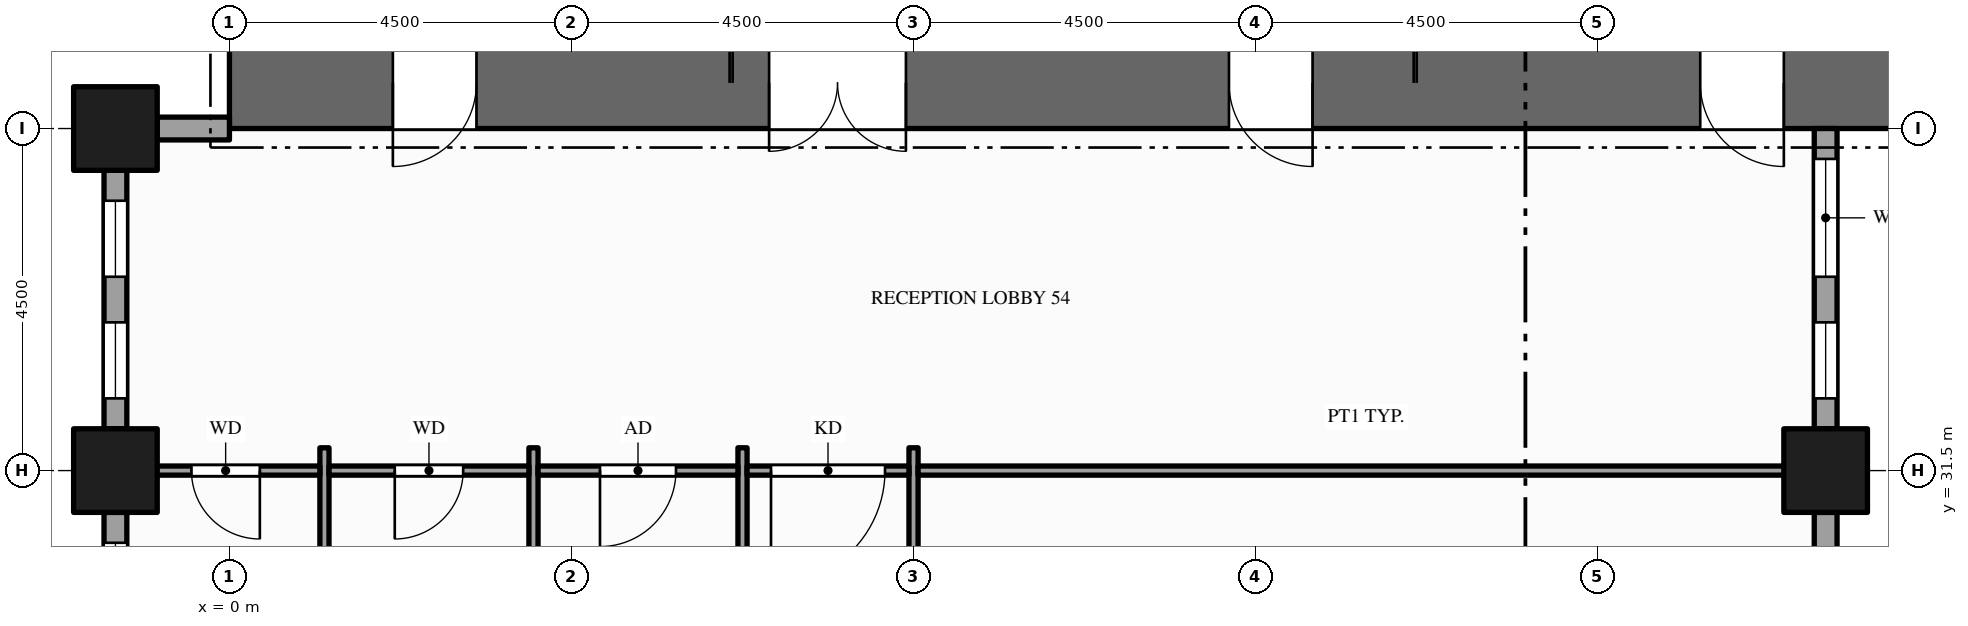
"""IFC4 building model, lengths in metres.
Left out: names, types, materials, properties, quantities, classifications, styles, units other than length and angle.
Written with IfcOpenShell. Run it as: python <this file> out.ifc"""

import sys

from ifc_helpers import new_model, si_unit, direction, frame, frame_2d, origin, origin_2d, place, context, subcontext, project, spatial, rectangle, hollow_rectangle, extrude, element, fill, save


model = new_model("IFC4")
c1 = context("Model", 3, precision=1e-05, world=origin(), true_north=direction((0.0, 1.0)))
c2 = subcontext(c1, "Body", "Model", "MODEL_VIEW")
j1 = project(units=[si_unit("LENGTHUNIT", "METRE"), si_unit("PLANEANGLEUNIT", "RADIAN")], contexts=[c1])
p1 = place(None, origin())
s1 = spatial("IfcSite", under=j1, at=p1, CompositionType="ELEMENT")
p2 = place(p1, origin())
s2 = spatial("IfcBuilding", under=s1, at=p2, CompositionType="ELEMENT")
p3 = place(p2, frame((0.0, 0.0, 45.0)))
s3 = spatial("IfcBuildingStorey", under=s2, at=p3, CompositionType="ELEMENT", Elevation=45.0)
p4 = place(p3, frame((0.0, 36.6, -0.15), z_axis=(0.0, 0.0, 1.0), x_axis=(1.0, 0.0, 0.0)))
e1 = element("IfcWall", 1, at=p4, inside=s3, PredefinedType="SHEAR", context=c2, shape_type="SweptSolid", body=[
    extrude(rectangle(XDim=22.5, YDim=1.2, at=frame_2d((11.25, 0.0))), origin(), (0.0, 0.0, 1.0), 4.0),
])
p5 = place(p4, frame((7.1, 0.0, 0.15)))
e2 = element("IfcOpeningElement", 2, at=p5, cuts=e1, PredefinedType="OPENING", context=c2, shape_type="SweptSolid", body=[
    extrude(rectangle(XDim=1.8, YDim=2.1, at=frame_2d((0.9, 1.05))), frame((0.0, 0.61, 0.0), z_axis=(0.0, -1.0, 0.0), x_axis=(1.0, 0.0, 0.0)), (0.0, 0.0, 1.0), 1.22),
])
p6 = place(p4, frame((13.15, 0.0, 0.15)))
e3 = element("IfcOpeningElement", 3, at=p6, cuts=e1, PredefinedType="OPENING", context=c2, shape_type="SweptSolid", body=[
    extrude(rectangle(XDim=1.1, YDim=2.1, at=frame_2d((0.55, 1.05))), frame((0.0, 0.61, 0.0), z_axis=(0.0, -1.0, 0.0), x_axis=(1.0, 0.0, 0.0)), (0.0, 0.0, 1.0), 1.22),
])
p7 = place(p4, frame((2.15, 0.0, 0.15)))
e4 = element("IfcOpeningElement", 4, at=p7, cuts=e1, PredefinedType="OPENING", context=c2, shape_type="SweptSolid", body=[
    extrude(rectangle(XDim=1.1, YDim=2.1, at=frame_2d((0.55, 1.05))), frame((0.0, 0.61, 0.0), z_axis=(0.0, -1.0, 0.0), x_axis=(1.0, 0.0, 0.0)), (0.0, 0.0, 1.0), 1.22),
])
p8 = place(p4, frame((19.35, 0.0, 0.15)))
e5 = element("IfcOpeningElement", 5, at=p8, cuts=e1, PredefinedType="OPENING", context=c2, shape_type="SweptSolid", body=[
    extrude(rectangle(XDim=1.1, YDim=2.1, at=frame_2d((0.55, 1.05))), frame((0.0, 0.61, 0.0), z_axis=(0.0, -1.0, 0.0), x_axis=(1.0, 0.0, 0.0)), (0.0, 0.0, 1.0), 1.22),
])
for number, where, z_axis, x_axis in (
    (6, (-1.5, 31.5, -0.15), (0.0, 0.0, 1.0), (1.0, 0.0, 0.0)),
    (7, (-1.5, 36.0, -0.15), (0.0, 0.0, 1.0), (1.0, 0.0, 0.0)),
    (8, (21.0, 31.5, -0.15), (0.0, 0.0, 1.0), (1.0, 0.0, 0.0)),
):
    element("IfcColumn", number, at=place(p3, frame(where, z_axis=z_axis, x_axis=x_axis)), inside=s3, PredefinedType="COLUMN", context=c2, shape_type="SweptSolid", body=[
        extrude(hollow_rectangle(XDim=1.1, YDim=1.1, WallThickness=0.06, at=origin_2d()), origin(), (0.0, 0.0, 1.0), 4.0),
    ])
p9 = place(p3, frame((21.0, 29.05, 0.0), z_axis=(0.0, 0.0, 1.0), x_axis=(0.0, 1.0, 0.0)))
e9 = element("IfcWall", 9, at=p9, inside=s3, PredefinedType="STANDARD", context=c2, shape_type="SweptSolid", body=[
    extrude(rectangle(XDim=1.9, YDim=0.3, at=frame_2d((0.95, 0.0))), origin(), (0.0, 0.0, 1.0), 3.144),
])
p10 = place(p3, frame((21.0, 32.05, 0.0), z_axis=(0.0, 0.0, 1.0), x_axis=(0.0, 1.0, 0.0)))
e10 = element("IfcWall", 10, at=p10, inside=s3, PredefinedType="STANDARD", context=c2, shape_type="SweptSolid", body=[
    extrude(rectangle(XDim=3.95, YDim=0.3, at=frame_2d((1.975, 0.0))), origin(), (0.0, 0.0, 1.0), 3.144),
])
p11 = place(p10, frame((0.4, 0.0, 0.9)))
e11 = element("IfcOpeningElement", 11, at=p11, cuts=e10, PredefinedType="OPENING", context=c2, shape_type="SweptSolid", body=[
    extrude(rectangle(XDim=1.0, YDim=2.0, at=frame_2d((0.5, 1.0))), frame((0.0, 0.16, 0.0), z_axis=(0.0, -1.0, 0.0), x_axis=(1.0, 0.0, 0.0)), (0.0, 0.0, 1.0), 0.32),
])
p12 = place(p10, frame((2.0, 0.0, 0.9)))
e12 = element("IfcOpeningElement", 12, at=p12, cuts=e10, PredefinedType="OPENING", context=c2, shape_type="SweptSolid", body=[
    extrude(rectangle(XDim=1.55, YDim=2.0, at=frame_2d((0.775, 1.0))), frame((0.0, 0.16, 0.0), z_axis=(0.0, -1.0, 0.0), x_axis=(1.0, 0.0, 0.0)), (0.0, 0.0, 1.0), 0.32),
])
p13 = place(p3, frame((0.0, 36.0, 0.0), z_axis=(0.0, 0.0, 1.0), x_axis=(-1.0, 0.0, 0.0)))
e13 = element("IfcWall", 13, at=p13, inside=s3, PredefinedType="STANDARD", context=c2, shape_type="SweptSolid", body=[
    extrude(rectangle(XDim=0.95, YDim=0.3, at=frame_2d((0.475, 0.0))), origin(), (0.0, 0.0, 1.0), 2.938),
])
p14 = place(p3, frame((-1.5, 35.45, 0.0), z_axis=(0.0, 0.0, 1.0), x_axis=(0.0, -1.0, 0.0)))
e14 = element("IfcWall", 14, at=p14, inside=s3, PredefinedType="STANDARD", context=c2, shape_type="SweptSolid", body=[
    extrude(rectangle(XDim=3.4, YDim=0.3, at=frame_2d((1.7, 0.0))), origin(), (0.0, 0.0, 1.0), 3.144),
])
p15 = place(p14, frame((0.4, 0.0, 0.9)))
e15 = element("IfcOpeningElement", 15, at=p15, cuts=e14, PredefinedType="OPENING", context=c2, shape_type="SweptSolid", body=[
    extrude(rectangle(XDim=1.0, YDim=2.0, at=frame_2d((0.5, 1.0))), frame((0.0, 0.16, 0.0), z_axis=(0.0, -1.0, 0.0), x_axis=(1.0, 0.0, 0.0)), (0.0, 0.0, 1.0), 0.32),
])
p16 = place(p14, frame((2.0, 0.0, 0.9)))
e16 = element("IfcOpeningElement", 16, at=p16, cuts=e14, PredefinedType="OPENING", context=c2, shape_type="SweptSolid", body=[
    extrude(rectangle(XDim=1.0, YDim=2.0, at=frame_2d((0.5, 1.0))), frame((0.0, 0.16, 0.0), z_axis=(0.0, -1.0, 0.0), x_axis=(1.0, 0.0, 0.0)), (0.0, 0.0, 1.0), 0.32),
])
p17 = place(p3, frame((-1.5, 30.95, 0.0), z_axis=(0.0, 0.0, 1.0), x_axis=(0.0, -1.0, 0.0)))
e17 = element("IfcWall", 17, at=p17, inside=s3, PredefinedType="STANDARD", context=c2, shape_type="SweptSolid", body=[
    extrude(rectangle(XDim=3.4, YDim=0.3, at=frame_2d((1.7, 0.0))), origin(), (0.0, 0.0, 1.0), 3.144),
])
p18 = place(p17, frame((0.4, 0.0, 0.9)))
e18 = element("IfcOpeningElement", 18, at=p18, cuts=e17, PredefinedType="OPENING", context=c2, shape_type="SweptSolid", body=[
    extrude(rectangle(XDim=1.0, YDim=2.0, at=frame_2d((0.5, 1.0))), frame((0.0, 0.16, 0.0), z_axis=(0.0, -1.0, 0.0), x_axis=(1.0, 0.0, 0.0)), (0.0, 0.0, 1.0), 0.32),
])
p19 = place(p17, frame((2.0, 0.0, 0.9)))
e19 = element("IfcOpeningElement", 19, at=p19, cuts=e17, PredefinedType="OPENING", context=c2, shape_type="SweptSolid", body=[
    extrude(rectangle(XDim=1.0, YDim=2.0, at=frame_2d((0.5, 1.0))), frame((0.0, 0.16, 0.0), z_axis=(0.0, -1.0, 0.0), x_axis=(1.0, 0.0, 0.0)), (0.0, 0.0, 1.0), 0.32),
])
for number, where, z_axis, x_axis in (
    (20, (1.25, 26.7, 0.0), (0.0, 0.0, 1.0), (0.0, 1.0, 0.0)),
    (21, (4.0, 26.7, 0.0), (0.0, 0.0, 1.0), (0.0, 1.0, 0.0)),
):
    element("IfcWall", number, at=place(p3, frame(where, z_axis=z_axis, x_axis=x_axis)), inside=s3, PredefinedType="PARTITIONING", context=c2, shape_type="SweptSolid", body=[
        extrude(rectangle(XDim=5.1, YDim=0.12, at=frame_2d((2.55, 0.0))), origin(), (0.0, 0.0, 1.0), 3.85),
    ])
p20 = place(p3, frame((6.75, 13.2, 0.0), z_axis=(0.0, 0.0, 1.0), x_axis=(0.0, 1.0, 0.0)))
e22 = element("IfcWall", 22, at=p20, inside=s3, PredefinedType="PARTITIONING", context=c2, shape_type="SweptSolid", body=[
    extrude(rectangle(XDim=18.6, YDim=0.12, at=frame_2d((9.3, 0.0))), origin(), (0.0, 0.0, 1.0), 2.6),
])
p21 = place(p20, frame((3.175, 0.0, 0.0)))
e23 = element("IfcOpeningElement", 23, at=p21, cuts=e22, PredefinedType="OPENING", context=c2, shape_type="SweptSolid", body=[
    extrude(rectangle(XDim=1.0, YDim=2.1, at=frame_2d((0.5, 1.05))), frame((0.0, 0.07, 0.0), z_axis=(0.0, -1.0, 0.0), x_axis=(1.0, 0.0, 0.0)), (0.0, 0.0, 1.0), 0.14),
])
p22 = place(p20, frame((9.955, 0.0, 0.0)))
e24 = element("IfcOpeningElement", 24, at=p22, cuts=e22, PredefinedType="OPENING", context=c2, shape_type="SweptSolid", body=[
    extrude(rectangle(XDim=1.0, YDim=2.1, at=frame_2d((0.5, 1.05))), frame((0.0, 0.07, 0.0), z_axis=(0.0, -1.0, 0.0), x_axis=(1.0, 0.0, 0.0)), (0.0, 0.0, 1.0), 0.14),
])
p23 = place(p3, frame((9.0, 13.2, 0.0), z_axis=(0.0, 0.0, 1.0), x_axis=(0.0, 1.0, 0.0)))
e25 = element("IfcWall", 25, at=p23, inside=s3, PredefinedType="PARTITIONING", context=c2, shape_type="SweptSolid", body=[
    extrude(rectangle(XDim=18.6, YDim=0.12, at=frame_2d((9.3, 0.0))), origin(), (0.0, 0.0, 1.0), 2.6),
])
p24 = place(p23, frame((14.325, 0.0, 0.0)))
e26 = element("IfcOpeningElement", 26, at=p24, cuts=e25, PredefinedType="OPENING", context=c2, shape_type="SweptSolid", body=[
    extrude(rectangle(XDim=1.2, YDim=2.1, at=frame_2d((0.6, 1.05))), frame((0.0, 0.07, 0.0), z_axis=(0.0, -1.0, 0.0), x_axis=(1.0, 0.0, 0.0)), (0.0, 0.0, 1.0), 0.14),
])
p25 = place(p23, frame((4.2, 0.0, 0.0)))
e27 = element("IfcOpeningElement", 27, at=p25, cuts=e25, PredefinedType="OPENING", context=c2, shape_type="SweptSolid", body=[
    extrude(rectangle(XDim=1.2, YDim=2.1, at=frame_2d((0.6, 1.05))), frame((0.0, 0.07, 0.0), z_axis=(0.0, -1.0, 0.0), x_axis=(1.0, 0.0, 0.0)), (0.0, 0.0, 1.0), 0.14),
])
p26 = place(p3, frame((-1.35, 31.5, 0.0), z_axis=(0.0, 0.0, 1.0), x_axis=(1.0, 0.0, 0.0)))
e28 = element("IfcWall", 28, at=p26, inside=s3, PredefinedType="PARTITIONING", context=c2, shape_type="SweptSolid", body=[
    extrude(rectangle(XDim=2.54, YDim=0.12, at=frame_2d((1.27, 0.0))), origin(), (0.0, 0.0, 1.0), 2.938),
])
p27 = place(p26, frame((0.85, 0.0, 0.0)))
e29 = element("IfcOpeningElement", 29, at=p27, cuts=e28, PredefinedType="OPENING", context=c2, shape_type="SweptSolid", body=[
    extrude(rectangle(XDim=0.9, YDim=2.1, at=frame_2d((0.45, 1.05))), frame((0.0, 0.07, 0.0), z_axis=(0.0, -1.0, 0.0), x_axis=(1.0, 0.0, 0.0)), (0.0, 0.0, 1.0), 0.14),
])
p28 = place(p3, frame((1.31, 31.5, 0.0), z_axis=(0.0, 0.0, 1.0), x_axis=(1.0, 0.0, 0.0)))
e30 = element("IfcWall", 30, at=p28, inside=s3, PredefinedType="PARTITIONING", context=c2, shape_type="SweptSolid", body=[
    extrude(rectangle(XDim=2.63, YDim=0.12, at=frame_2d((1.315, 0.0))), origin(), (0.0, 0.0, 1.0), 2.938),
])
p29 = place(p28, frame((0.865, 0.0, 0.0)))
e31 = element("IfcOpeningElement", 31, at=p29, cuts=e30, PredefinedType="OPENING", context=c2, shape_type="SweptSolid", body=[
    extrude(rectangle(XDim=0.9, YDim=2.1, at=frame_2d((0.45, 1.05))), frame((0.0, 0.07, 0.0), z_axis=(0.0, -1.0, 0.0), x_axis=(1.0, 0.0, 0.0)), (0.0, 0.0, 1.0), 0.14),
])
p30 = place(p3, frame((4.06, 31.5, 0.0), z_axis=(0.0, 0.0, 1.0), x_axis=(1.0, 0.0, 0.0)))
e32 = element("IfcWall", 32, at=p30, inside=s3, PredefinedType="PARTITIONING", context=c2, shape_type="SweptSolid", body=[
    extrude(rectangle(XDim=2.63, YDim=0.12, at=frame_2d((1.315, 0.0))), origin(), (0.0, 0.0, 1.0), 2.938),
])
p31 = place(p30, frame((0.815, 0.0, 0.0)))
e33 = element("IfcOpeningElement", 33, at=p31, cuts=e32, PredefinedType="OPENING", context=c2, shape_type="SweptSolid", body=[
    extrude(rectangle(XDim=1.0, YDim=2.1, at=frame_2d((0.5, 1.05))), frame((0.0, 0.07, 0.0), z_axis=(0.0, -1.0, 0.0), x_axis=(1.0, 0.0, 0.0)), (0.0, 0.0, 1.0), 0.14),
])
p32 = place(p3, frame((6.81, 31.5, 0.0), z_axis=(0.0, 0.0, 1.0), x_axis=(1.0, 0.0, 0.0)))
e34 = element("IfcWall", 34, at=p32, inside=s3, PredefinedType="PARTITIONING", context=c2, shape_type="SweptSolid", body=[
    extrude(rectangle(XDim=2.13, YDim=0.12, at=frame_2d((1.065, 0.0))), origin(), (0.0, 0.0, 1.0), 2.938),
])
p33 = place(p32, frame((0.315, 0.0, 0.0)))
e35 = element("IfcOpeningElement", 35, at=p33, cuts=e34, PredefinedType="OPENING", context=c2, shape_type="SweptSolid", body=[
    extrude(rectangle(XDim=1.5, YDim=2.1, at=frame_2d((0.75, 1.05))), frame((0.0, 0.07, 0.0), z_axis=(0.0, -1.0, 0.0), x_axis=(1.0, 0.0, 0.0)), (0.0, 0.0, 1.0), 0.14),
])
p34 = place(p3, frame((9.06, 31.5, 0.0), z_axis=(0.0, 0.0, 1.0), x_axis=(1.0, 0.0, 0.0)))
e36 = element("IfcWall", 36, at=p34, inside=s3, PredefinedType="PARTITIONING", context=c2, shape_type="SweptSolid", body=[
    extrude(rectangle(XDim=11.79, YDim=0.12, at=frame_2d((5.895, 0.0))), origin(), (0.0, 0.0, 1.0), 2.938),
])
p35 = place(p11, origin())
e37 = element("IfcWindow", 37, at=p35, inside=s3, PartitioningType="SINGLE_PANEL", PredefinedType="WINDOW", context=c2, shape_type="SweptSolid", body=[
    extrude(rectangle(XDim=1.0, YDim=2.0, at=frame_2d((0.5, 1.0))), frame((0.0, 0.03, 0.0), z_axis=(0.0, -1.0, 0.0), x_axis=(1.0, 0.0, 0.0)), (0.0, 0.0, 1.0), 0.06),
])
fill(e11, e37)
p36 = place(p12, origin())
e38 = element("IfcWindow", 38, at=p36, inside=s3, PartitioningType="SINGLE_PANEL", PredefinedType="WINDOW", context=c2, shape_type="SweptSolid", body=[
    extrude(rectangle(XDim=1.55, YDim=2.0, at=frame_2d((0.775, 1.0))), frame((0.0, 0.03, 0.0), z_axis=(0.0, -1.0, 0.0), x_axis=(1.0, 0.0, 0.0)), (0.0, 0.0, 1.0), 0.06),
])
fill(e12, e38)
p37 = place(p15, origin())
e39 = element("IfcWindow", 39, at=p37, inside=s3, PartitioningType="SINGLE_PANEL", PredefinedType="WINDOW", context=c2, shape_type="SweptSolid", body=[
    extrude(rectangle(XDim=1.0, YDim=2.0, at=frame_2d((0.5, 1.0))), frame((0.0, 0.03, 0.0), z_axis=(0.0, -1.0, 0.0), x_axis=(1.0, 0.0, 0.0)), (0.0, 0.0, 1.0), 0.06),
])
fill(e15, e39)
p38 = place(p16, origin())
e40 = element("IfcWindow", 40, at=p38, inside=s3, PartitioningType="SINGLE_PANEL", PredefinedType="WINDOW", context=c2, shape_type="SweptSolid", body=[
    extrude(rectangle(XDim=1.0, YDim=2.0, at=frame_2d((0.5, 1.0))), frame((0.0, 0.03, 0.0), z_axis=(0.0, -1.0, 0.0), x_axis=(1.0, 0.0, 0.0)), (0.0, 0.0, 1.0), 0.06),
])
fill(e16, e40)
p39 = place(p18, origin())
e41 = element("IfcWindow", 41, at=p39, inside=s3, PartitioningType="SINGLE_PANEL", PredefinedType="WINDOW", context=c2, shape_type="SweptSolid", body=[
    extrude(rectangle(XDim=1.0, YDim=2.0, at=frame_2d((0.5, 1.0))), frame((0.0, 0.03, 0.0), z_axis=(0.0, -1.0, 0.0), x_axis=(1.0, 0.0, 0.0)), (0.0, 0.0, 1.0), 0.06),
])
fill(e18, e41)
p40 = place(p5, origin())
e42 = element("IfcDoor", 42, at=p40, inside=s3, OperationType="DOUBLE_DOOR_SINGLE_SWING", PredefinedType="DOOR", context=c2, shape_type="SweptSolid", body=[
    extrude(rectangle(XDim=1.8, YDim=2.1, at=frame_2d((0.9, 1.05))), frame((0.0, 0.025, 0.0), z_axis=(0.0, -1.0, 0.0), x_axis=(1.0, 0.0, 0.0)), (0.0, 0.0, 1.0), 0.05),
])
fill(e2, e42)
p41 = place(p6, origin())
e43 = element("IfcDoor", 43, at=p41, inside=s3, OperationType="SINGLE_SWING_RIGHT", PredefinedType="DOOR", context=c2, shape_type="SweptSolid", body=[
    extrude(rectangle(XDim=1.1, YDim=2.1, at=frame_2d((0.55, 1.05))), frame((0.0, 0.025, 0.0), z_axis=(0.0, -1.0, 0.0), x_axis=(1.0, 0.0, 0.0)), (0.0, 0.0, 1.0), 0.05),
])
fill(e3, e43)
p42 = place(p7, origin())
e44 = element("IfcDoor", 44, at=p42, inside=s3, OperationType="SINGLE_SWING_LEFT", PredefinedType="DOOR", context=c2, shape_type="SweptSolid", body=[
    extrude(rectangle(XDim=1.1, YDim=2.1, at=frame_2d((0.55, 1.05))), frame((0.0, 0.025, 0.0), z_axis=(0.0, -1.0, 0.0), x_axis=(1.0, 0.0, 0.0)), (0.0, 0.0, 1.0), 0.05),
])
fill(e4, e44)
p43 = place(p8, origin())
e45 = element("IfcDoor", 45, at=p43, inside=s3, OperationType="SINGLE_SWING_RIGHT", PredefinedType="DOOR", context=c2, shape_type="SweptSolid", body=[
    extrude(rectangle(XDim=1.1, YDim=2.1, at=frame_2d((0.55, 1.05))), frame((0.0, 0.025, 0.0), z_axis=(0.0, -1.0, 0.0), x_axis=(1.0, 0.0, 0.0)), (0.0, 0.0, 1.0), 0.05),
])
fill(e5, e45)
p44 = place(p33, origin())
e46 = element("IfcDoor", 46, at=p44, inside=s3, OperationType="SINGLE_SWING_LEFT", PredefinedType="DOOR", context=c2, shape_type="SweptSolid", body=[
    extrude(rectangle(XDim=1.5, YDim=2.1, at=frame_2d((0.75, 1.05))), frame((0.0, 0.025, 0.0), z_axis=(0.0, -1.0, 0.0), x_axis=(1.0, 0.0, 0.0)), (0.0, 0.0, 1.0), 0.05),
])
fill(e35, e46)
p45 = place(p27, origin())
e47 = element("IfcDoor", 47, at=p45, inside=s3, OperationType="SINGLE_SWING_RIGHT", PredefinedType="DOOR", context=c2, shape_type="SweptSolid", body=[
    extrude(rectangle(XDim=0.9, YDim=2.1, at=frame_2d((0.45, 1.05))), frame((0.0, 0.025, 0.0), z_axis=(0.0, -1.0, 0.0), x_axis=(1.0, 0.0, 0.0)), (0.0, 0.0, 1.0), 0.05),
])
fill(e29, e47)
p46 = place(p29, origin())
e48 = element("IfcDoor", 48, at=p46, inside=s3, OperationType="SINGLE_SWING_LEFT", PredefinedType="DOOR", context=c2, shape_type="SweptSolid", body=[
    extrude(rectangle(XDim=0.9, YDim=2.1, at=frame_2d((0.45, 1.05))), frame((0.0, 0.025, 0.0), z_axis=(0.0, -1.0, 0.0), x_axis=(1.0, 0.0, 0.0)), (0.0, 0.0, 1.0), 0.05),
])
fill(e31, e48)
p47 = place(p31, origin())
e49 = element("IfcDoor", 49, at=p47, inside=s3, OperationType="SINGLE_SWING_LEFT", PredefinedType="DOOR", context=c2, shape_type="SweptSolid", body=[
    extrude(rectangle(XDim=1.0, YDim=2.1, at=frame_2d((0.5, 1.05))), frame((0.0, 0.025, 0.0), z_axis=(0.0, -1.0, 0.0), x_axis=(1.0, 0.0, 0.0)), (0.0, 0.0, 1.0), 0.05),
])
fill(e33, e49)
save(model, sys.argv[1])
